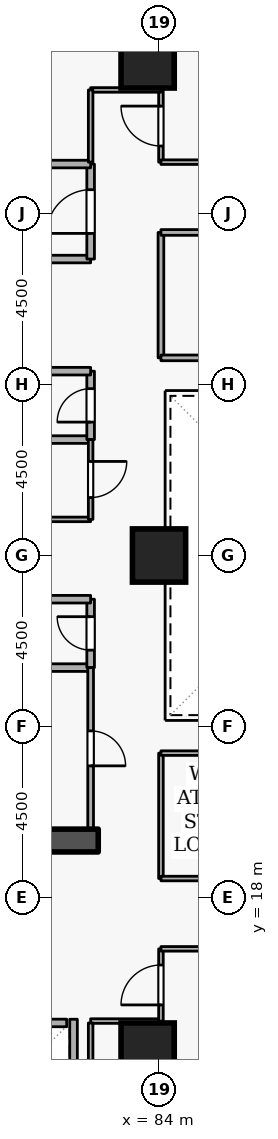
"""IFC4 building model, lengths in metres.
Left out: names, types, materials, properties, quantities, classifications, styles, units other than length and angle.
Written with IfcOpenShell. Run it as: python <this file> out.ifc"""

import sys

from ifc_helpers import new_model, si_unit, direction, frame, frame_2d, origin, origin_2d, place, context, subcontext, project, spatial, rectangle, extrude, element, fill, save


model = new_model("IFC4")
c1 = context("Model", 3, precision=1e-05, world=origin(), true_north=direction((0.0, 1.0)))
c2 = subcontext(c1, "Body", "Model", "MODEL_VIEW")
j1 = project(units=[si_unit("LENGTHUNIT", "METRE"), si_unit("PLANEANGLEUNIT", "RADIAN")], contexts=[c1])
p1 = place(None, origin())
s1 = spatial("IfcSite", under=j1, at=p1, CompositionType="ELEMENT")
p2 = place(p1, origin())
s2 = spatial("IfcBuilding", under=s1, at=p2, CompositionType="ELEMENT")
p3 = place(p2, frame((0.0, 0.0, 45.9)))
s3 = spatial("IfcBuildingStorey", under=s2, at=p3, CompositionType="ELEMENT", Elevation=45.9)
p4 = place(p3, frame((76.7, 19.5, 0.0), z_axis=(0.0, 0.0, 1.0), x_axis=(1.0, 0.0, 0.0)))
e1 = element("IfcWall", 1, at=p4, inside=s3, PredefinedType="SHEAR", context=c2, shape_type="SweptSolid", body=[
    extrude(rectangle(XDim=5.7, YDim=0.6, at=frame_2d((2.85, 0.0))), origin(), (0.0, 0.0, 1.0), 3.6),
])
for number, where, z_axis, x_axis in (
    (2, (83.7, 14.0, 0.0), (0.0, 0.0, 1.0), (1.0, 0.0, 0.0)),
    (3, (83.7, 40.0, 0.0), (0.0, 0.0, 1.0), (1.0, 0.0, 0.0)),
    (4, (84.0, 27.0, 0.0), (0.0, 0.0, 1.0), (1.0, 0.0, 0.0)),
):
    element("IfcColumn", number, at=place(p3, frame(where, z_axis=z_axis, x_axis=x_axis)), inside=s3, PredefinedType="COLUMN", context=c2, shape_type="SweptSolid", body=[
        extrude(rectangle(XDim=1.4, YDim=1.4, at=origin_2d()), origin(), (0.0, 0.0, 1.0), 3.6),
    ])
p5 = place(p3, frame((79.63, 14.7, 0.0), z_axis=(0.0, 0.0, 1.0), x_axis=(1.0, 0.0, 0.0)))
e5 = element("IfcWall", 5, at=p5, inside=s3, PredefinedType="STANDARD", context=c2, shape_type="SweptSolid", body=[
    extrude(rectangle(XDim=1.94, YDim=0.2, at=frame_2d((0.97, 0.0))), origin(), (0.0, 0.0, 1.0), 3.26),
])
p6 = place(p3, frame((81.75, 12.612, 0.0), z_axis=(0.0, 0.0, 1.0), x_axis=(0.0, 1.0, 0.0)))
e6 = element("IfcWall", 6, at=p6, inside=s3, PredefinedType="STANDARD", context=c2, shape_type="SweptSolid", body=[
    extrude(rectangle(XDim=2.186, YDim=0.2, at=frame_2d((1.093, 0.0))), origin(), (0.0, 0.0, 1.0), 3.26),
])
p7 = place(p3, frame((79.9, 34.8, 0.0), z_axis=(0.0, 0.0, 1.0), x_axis=(1.0, 0.0, 0.0)))
e7 = element("IfcWall", 7, at=p7, inside=s3, PredefinedType="STANDARD", context=c2, shape_type="SweptSolid", body=[
    extrude(rectangle(XDim=2.3, YDim=0.2, at=frame_2d((1.15, 0.0))), origin(), (0.0, 0.0, 1.0), 2.465),
])
p8 = place(p3, frame((82.2, 34.8, 0.0), z_axis=(0.0, 0.0, 1.0), x_axis=(0.0, 1.0, 0.0)))
e8 = element("IfcWall", 8, at=p8, inside=s3, PredefinedType="STANDARD", context=c2, shape_type="SweptSolid", body=[
    extrude(rectangle(XDim=2.5, YDim=0.2, at=frame_2d((1.25, 0.0))), origin(), (0.0, 0.0, 1.0), 3.26),
])
p9 = place(p8, frame((0.675, 0.0, 0.0)))
e9 = element("IfcOpeningElement", 9, at=p9, cuts=e8, PredefinedType="OPENING", context=c2, shape_type="SweptSolid", body=[
    extrude(rectangle(XDim=1.15, YDim=2.1, at=frame_2d((0.575, 1.05))), frame((0.0, 0.11, 0.0), z_axis=(0.0, -1.0, 0.0), x_axis=(1.0, 0.0, 0.0)), (0.0, 0.0, 1.0), 0.22),
])
p10 = place(p3, frame((82.2, 37.3, 0.0), z_axis=(0.0, 0.0, 1.0), x_axis=(-1.0, 0.0, 0.0)))
e10 = element("IfcWall", 10, at=p10, inside=s3, PredefinedType="STANDARD", context=c2, shape_type="SweptSolid", body=[
    extrude(rectangle(XDim=5.7, YDim=0.2, at=frame_2d((2.85, 0.0))), origin(), (0.0, 0.0, 1.0), 3.26),
])
p11 = place(p3, frame((80.15, 24.05, 0.0), z_axis=(0.0, 0.0, 1.0), x_axis=(1.0, 0.0, 0.0)))
e11 = element("IfcWall", 11, at=p11, inside=s3, PredefinedType="STANDARD", context=c2, shape_type="SweptSolid", body=[
    extrude(rectangle(XDim=2.05, YDim=0.2, at=frame_2d((1.025, 0.0))), origin(), (0.0, 0.0, 1.0), 3.26),
])
p12 = place(p3, frame((82.2, 24.05, 0.0), z_axis=(0.0, 0.0, 1.0), x_axis=(0.0, 1.0, 0.0)))
e12 = element("IfcWall", 12, at=p12, inside=s3, PredefinedType="STANDARD", context=c2, shape_type="SweptSolid", body=[
    extrude(rectangle(XDim=1.8, YDim=0.2, at=frame_2d((0.9, 0.0))), origin(), (0.0, 0.0, 1.0), 3.26),
])
p13 = place(p12, frame((0.46, 0.0, 0.0)))
e13 = element("IfcOpeningElement", 13, at=p13, cuts=e12, PredefinedType="OPENING", context=c2, shape_type="SweptSolid", body=[
    extrude(rectangle(XDim=0.88, YDim=2.04, at=frame_2d((0.44, 1.02))), frame((0.0, 0.11, 0.0), z_axis=(0.0, -1.0, 0.0), x_axis=(1.0, 0.0, 0.0)), (0.0, 0.0, 1.0), 0.22),
])
for number, where, z_axis, x_axis in (
    (14, (82.2, 25.85, 0.0), (0.0, 0.0, 1.0), (-1.0, 0.0, 0.0)),
    (15, (80.15, 30.05, 0.0), (0.0, 0.0, 1.0), (1.0, 0.0, 0.0)),
):
    element("IfcWall", number, at=place(p3, frame(where, z_axis=z_axis, x_axis=x_axis)), inside=s3, PredefinedType="STANDARD", context=c2, shape_type="SweptSolid", body=[
        extrude(rectangle(XDim=2.05, YDim=0.2, at=frame_2d((1.025, 0.0))), origin(), (0.0, 0.0, 1.0), 3.26),
    ])
p14 = place(p3, frame((82.2, 30.05, 0.0), z_axis=(0.0, 0.0, 1.0), x_axis=(0.0, 1.0, 0.0)))
e16 = element("IfcWall", 16, at=p14, inside=s3, PredefinedType="STANDARD", context=c2, shape_type="SweptSolid", body=[
    extrude(rectangle(XDim=1.8, YDim=0.2, at=frame_2d((0.9, 0.0))), origin(), (0.0, 0.0, 1.0), 3.26),
])
p15 = place(p14, frame((0.46, 0.0, 0.0)))
e17 = element("IfcOpeningElement", 17, at=p15, cuts=e16, PredefinedType="OPENING", context=c2, shape_type="SweptSolid", body=[
    extrude(rectangle(XDim=0.88, YDim=2.04, at=frame_2d((0.44, 1.02))), frame((0.0, 0.11, 0.0), z_axis=(0.0, -1.0, 0.0), x_axis=(1.0, 0.0, 0.0)), (0.0, 0.0, 1.0), 0.22),
])
p16 = place(p3, frame((82.2, 31.85, 0.0), z_axis=(0.0, 0.0, 1.0), x_axis=(-1.0, 0.0, 0.0)))
e18 = element("IfcWall", 18, at=p16, inside=s3, PredefinedType="STANDARD", context=c2, shape_type="SweptSolid", body=[
    extrude(rectangle(XDim=2.05, YDim=0.2, at=frame_2d((1.025, 0.0))), origin(), (0.0, 0.0, 1.0), 3.26),
])
p17 = place(p3, frame((82.2, 24.05, 0.0), z_axis=(0.0, 0.0, 1.0), x_axis=(0.0, -1.0, 0.0)))
e19 = element("IfcWall", 19, at=p17, inside=s3, PredefinedType="PARTITIONING", context=c2, shape_type="SweptSolid", body=[
    extrude(rectangle(XDim=4.25, YDim=0.15, at=frame_2d((2.125, 0.0))), origin(), (0.0, 0.0, 1.0), 3.26),
])
p18 = place(p17, frame((1.665, 0.0, 0.0)))
e20 = element("IfcOpeningElement", 20, at=p18, cuts=e19, PredefinedType="OPENING", context=c2, shape_type="SweptSolid", body=[
    extrude(rectangle(XDim=0.92, YDim=2.08, at=frame_2d((0.46, 1.04))), frame((0.0, 0.085, 0.0), z_axis=(0.0, -1.0, 0.0), x_axis=(1.0, 0.0, 0.0)), (0.0, 0.0, 1.0), 0.17),
])
p19 = place(p3, frame((82.2, 27.95, 0.0), z_axis=(0.0, 0.0, 1.0), x_axis=(-1.0, 0.0, 0.0)))
e21 = element("IfcWall", 21, at=p19, inside=s3, PredefinedType="PARTITIONING", context=c2, shape_type="SweptSolid", body=[
    extrude(rectangle(XDim=2.05, YDim=0.12, at=frame_2d((1.025, 0.0))), origin(), (0.0, 0.0, 1.0), 3.26),
])
p20 = place(p3, frame((82.2, 30.05, 0.0), z_axis=(0.0, 0.0, 1.0), x_axis=(0.0, -1.0, 0.0)))
e22 = element("IfcWall", 22, at=p20, inside=s3, PredefinedType="PARTITIONING", context=c2, shape_type="SweptSolid", body=[
    extrude(rectangle(XDim=2.1, YDim=0.12, at=frame_2d((1.05, 0.0))), origin(), (0.0, 0.0, 1.0), 3.26),
])
p21 = place(p20, frame((0.575, 0.0, 0.0)))
e23 = element("IfcOpeningElement", 23, at=p21, cuts=e22, PredefinedType="OPENING", context=c2, shape_type="SweptSolid", body=[
    extrude(rectangle(XDim=0.95, YDim=2.1, at=frame_2d((0.475, 1.05))), frame((0.0, 0.07, 0.0), z_axis=(0.0, -1.0, 0.0), x_axis=(1.0, 0.0, 0.0)), (0.0, 0.0, 1.0), 0.14),
])
p22 = place(p3, frame((82.2, 14.75, 0.0), z_axis=(0.0, 0.0, 1.0), x_axis=(1.0, 0.0, 0.0)))
e24 = element("IfcWall", 24, at=p22, inside=s3, PredefinedType="PARTITIONING", context=c2, shape_type="SweptSolid", body=[
    extrude(rectangle(XDim=1.85, YDim=0.12, at=frame_2d((0.925, 0.0))), origin(), (0.0, 0.0, 1.0), 3.26),
])
p23 = place(p3, frame((84.05, 14.75, 0.0), z_axis=(0.0, 0.0, 1.0), x_axis=(0.0, 1.0, 0.0)))
e25 = element("IfcWall", 25, at=p23, inside=s3, PredefinedType="PARTITIONING", context=c2, shape_type="SweptSolid", body=[
    extrude(rectangle(XDim=1.9, YDim=0.12, at=frame_2d((0.95, 0.0))), origin(), (0.0, 0.0, 1.0), 3.26),
])
p24 = place(p23, frame((0.425, 0.0, 0.0)))
e26 = element("IfcOpeningElement", 26, at=p24, cuts=e25, PredefinedType="OPENING", context=c2, shape_type="SweptSolid", body=[
    extrude(rectangle(XDim=1.05, YDim=2.1, at=frame_2d((0.525, 1.05))), frame((0.0, 0.07, 0.0), z_axis=(0.0, -1.0, 0.0), x_axis=(1.0, 0.0, 0.0)), (0.0, 0.0, 1.0), 0.14),
])
p25 = place(p3, frame((84.05, 16.65, 0.0), z_axis=(0.0, 0.0, 1.0), x_axis=(1.0, 0.0, 0.0)))
e27 = element("IfcWall", 27, at=p25, inside=s3, PredefinedType="PARTITIONING", context=c2, shape_type="SweptSolid", body=[
    extrude(rectangle(XDim=1.3, YDim=0.12, at=frame_2d((0.65, 0.0))), origin(), (0.0, 0.0, 1.0), 3.26),
])
p26 = place(p3, frame((82.2, 12.4, 0.0), z_axis=(0.0, 0.0, 1.0), x_axis=(0.0, 1.0, 0.0)))
e28 = element("IfcWall", 28, at=p26, inside=s3, PredefinedType="PARTITIONING", context=c2, shape_type="SweptSolid", body=[
    extrude(rectangle(XDim=2.3, YDim=0.12, at=frame_2d((1.15, 0.0))), origin(), (0.0, 0.0, 1.0), 3.26),
])
p27 = place(p3, frame((84.05, 37.35, 0.0), z_axis=(0.0, 0.0, 1.0), x_axis=(0.0, 1.0, 0.0)))
e29 = element("IfcWall", 29, at=p27, inside=s3, PredefinedType="PARTITIONING", context=c2, shape_type="SweptSolid", body=[
    extrude(rectangle(XDim=1.9, YDim=0.12, at=frame_2d((0.95, 0.0))), origin(), (0.0, 0.0, 1.0), 3.26),
])
p28 = place(p27, frame((0.425, 0.0, 0.0)))
e30 = element("IfcOpeningElement", 30, at=p28, cuts=e29, PredefinedType="OPENING", context=c2, shape_type="SweptSolid", body=[
    extrude(rectangle(XDim=1.05, YDim=2.1, at=frame_2d((0.525, 1.05))), frame((0.0, 0.07, 0.0), z_axis=(0.0, -1.0, 0.0), x_axis=(1.0, 0.0, 0.0)), (0.0, 0.0, 1.0), 0.14),
])
p29 = place(p3, frame((84.05, 39.25, 0.0), z_axis=(0.0, 0.0, 1.0), x_axis=(-1.0, 0.0, 0.0)))
e31 = element("IfcWall", 31, at=p29, inside=s3, PredefinedType="PARTITIONING", context=c2, shape_type="SweptSolid", body=[
    extrude(rectangle(XDim=1.85, YDim=0.12, at=frame_2d((0.925, 0.0))), origin(), (0.0, 0.0, 1.0), 3.26),
])
p30 = place(p3, frame((82.2, 39.25, 0.0), z_axis=(0.0, 0.0, 1.0), x_axis=(0.0, -1.0, 0.0)))
e32 = element("IfcWall", 32, at=p30, inside=s3, PredefinedType="PARTITIONING", context=c2, shape_type="SweptSolid", body=[
    extrude(rectangle(XDim=1.9, YDim=0.12, at=frame_2d((0.95, 0.0))), origin(), (0.0, 0.0, 1.0), 3.26),
])
p31 = place(p3, frame((85.35, 37.35, 0.0), z_axis=(0.0, 0.0, 1.0), x_axis=(-1.0, 0.0, 0.0)))
e33 = element("IfcWall", 33, at=p31, inside=s3, PredefinedType="PARTITIONING", context=c2, shape_type="SweptSolid", body=[
    extrude(rectangle(XDim=1.3, YDim=0.12, at=frame_2d((0.65, 0.0))), origin(), (0.0, 0.0, 1.0), 3.26),
])
p32 = place(p3, frame((84.05, 32.2, 0.0), z_axis=(0.0, 0.0, 1.0), x_axis=(0.0, 1.0, 0.0)))
e34 = element("IfcWall", 34, at=p32, inside=s3, PredefinedType="PARTITIONING", context=c2, shape_type="SweptSolid", body=[
    extrude(rectangle(XDim=3.3, YDim=0.15, at=frame_2d((1.65, 0.0))), origin(), (0.0, 0.0, 1.0), 3.26),
])
p33 = place(p3, frame((84.05, 35.5, 0.0), z_axis=(0.0, 0.0, 1.0), x_axis=(1.0, 0.0, 0.0)))
e35 = element("IfcWall", 35, at=p33, inside=s3, PredefinedType="PARTITIONING", context=c2, shape_type="SweptSolid", body=[
    extrude(rectangle(XDim=8.9, YDim=0.15, at=frame_2d((4.45, 0.0))), origin(), (0.0, 0.0, 1.0), 3.26),
])
p34 = place(p33, frame((2.48, 0.0, 0.0)))
e36 = element("IfcOpeningElement", 36, at=p34, cuts=e35, PredefinedType="OPENING", context=c2, shape_type="SweptSolid", body=[
    extrude(rectangle(XDim=1.3, YDim=2.12, at=frame_2d((0.65, 1.06))), frame((0.0, 0.085, 0.0), z_axis=(0.0, -1.0, 0.0), x_axis=(1.0, 0.0, 0.0)), (0.0, 0.0, 1.0), 0.17),
])
p35 = place(p3, frame((92.95, 32.2, 0.0), z_axis=(0.0, 0.0, 1.0), x_axis=(-1.0, 0.0, 0.0)))
e37 = element("IfcWall", 37, at=p35, inside=s3, PredefinedType="PARTITIONING", context=c2, shape_type="SweptSolid", body=[
    extrude(rectangle(XDim=8.9, YDim=0.15, at=frame_2d((4.45, 0.0))), origin(), (0.0, 0.0, 1.0), 3.26),
])
p36 = place(p3, frame((84.05, 18.5, 0.0), z_axis=(0.0, 0.0, 1.0), x_axis=(0.0, 1.0, 0.0)))
e38 = element("IfcWall", 38, at=p36, inside=s3, PredefinedType="PARTITIONING", context=c2, shape_type="SweptSolid", body=[
    extrude(rectangle(XDim=3.3, YDim=0.12, at=frame_2d((1.65, 0.0))), origin(), (0.0, 0.0, 1.0), 3.26),
])
p37 = place(p3, frame((84.05, 21.8, 0.0), z_axis=(0.0, 0.0, 1.0), x_axis=(1.0, 0.0, 0.0)))
e39 = element("IfcWall", 39, at=p37, inside=s3, PredefinedType="PARTITIONING", context=c2, shape_type="SweptSolid", body=[
    extrude(rectangle(XDim=8.9, YDim=0.12, at=frame_2d((4.45, 0.0))), origin(), (0.0, 0.0, 1.0), 3.26),
])
p38 = place(p3, frame((92.95, 18.5, 0.0), z_axis=(0.0, 0.0, 1.0), x_axis=(-1.0, 0.0, 0.0)))
e40 = element("IfcWall", 40, at=p38, inside=s3, PredefinedType="PARTITIONING", context=c2, shape_type="SweptSolid", body=[
    extrude(rectangle(XDim=8.9, YDim=0.12, at=frame_2d((4.45, 0.0))), origin(), (0.0, 0.0, 1.0), 3.26),
])
p39 = place(p38, frame((3.975, 0.0, 0.0)))
e41 = element("IfcOpeningElement", 41, at=p39, cuts=e40, PredefinedType="OPENING", context=c2, shape_type="SweptSolid", body=[
    extrude(rectangle(XDim=0.95, YDim=2.1, at=frame_2d((0.475, 1.05))), frame((0.0, 0.07, 0.0), z_axis=(0.0, -1.0, 0.0), x_axis=(1.0, 0.0, 0.0)), (0.0, 0.0, 1.0), 0.14),
])
p40 = place(p9, origin())
e42 = element("IfcDoor", 42, at=p40, inside=s3, OperationType="SINGLE_SWING_LEFT", PredefinedType="DOOR", context=c2, shape_type="SweptSolid", body=[
    extrude(rectangle(XDim=1.15, YDim=2.1, at=frame_2d((0.575, 1.05))), frame((0.0, 0.025, 0.0), z_axis=(0.0, -1.0, 0.0), x_axis=(1.0, 0.0, 0.0)), (0.0, 0.0, 1.0), 0.05),
])
fill(e9, e42)
p41 = place(p13, origin())
e43 = element("IfcDoor", 43, at=p41, inside=s3, OperationType="SINGLE_SWING_RIGHT", PredefinedType="DOOR", context=c2, shape_type="SweptSolid", body=[
    extrude(rectangle(XDim=0.88, YDim=2.04, at=frame_2d((0.44, 1.02))), frame((0.0, 0.025, 0.0), z_axis=(0.0, -1.0, 0.0), x_axis=(1.0, 0.0, 0.0)), (0.0, 0.0, 1.0), 0.05),
])
fill(e13, e43)
p42 = place(p15, origin())
e44 = element("IfcDoor", 44, at=p42, inside=s3, OperationType="SINGLE_SWING_LEFT", PredefinedType="DOOR", context=c2, shape_type="SweptSolid", body=[
    extrude(rectangle(XDim=0.88, YDim=2.04, at=frame_2d((0.44, 1.02))), frame((0.0, 0.025, 0.0), z_axis=(0.0, -1.0, 0.0), x_axis=(1.0, 0.0, 0.0)), (0.0, 0.0, 1.0), 0.05),
])
fill(e17, e44)
p43 = place(p18, origin())
e45 = element("IfcDoor", 45, at=p43, inside=s3, OperationType="SINGLE_SWING_RIGHT", PredefinedType="DOOR", context=c2, shape_type="SweptSolid", body=[
    extrude(rectangle(XDim=0.92, YDim=2.08, at=frame_2d((0.46, 1.04))), frame((0.0, 0.025, 0.0), z_axis=(0.0, -1.0, 0.0), x_axis=(1.0, 0.0, 0.0)), (0.0, 0.0, 1.0), 0.05),
])
fill(e20, e45)
p44 = place(p21, origin())
e46 = element("IfcDoor", 46, at=p44, inside=s3, OperationType="SINGLE_SWING_LEFT", PredefinedType="DOOR", context=c2, shape_type="SweptSolid", body=[
    extrude(rectangle(XDim=0.95, YDim=2.1, at=frame_2d((0.475, 1.05))), frame((0.0, 0.025, 0.0), z_axis=(0.0, -1.0, 0.0), x_axis=(1.0, 0.0, 0.0)), (0.0, 0.0, 1.0), 0.05),
])
fill(e23, e46)
p45 = place(p24, origin())
e47 = element("IfcDoor", 47, at=p45, inside=s3, OperationType="SINGLE_SWING_LEFT", PredefinedType="DOOR", context=c2, shape_type="SweptSolid", body=[
    extrude(rectangle(XDim=1.05, YDim=2.1, at=frame_2d((0.525, 1.05))), frame((0.0, 0.025, 0.0), z_axis=(0.0, -1.0, 0.0), x_axis=(1.0, 0.0, 0.0)), (0.0, 0.0, 1.0), 0.05),
])
fill(e26, e47)
p46 = place(p28, origin())
e48 = element("IfcDoor", 48, at=p46, inside=s3, OperationType="SINGLE_SWING_RIGHT", PredefinedType="DOOR", context=c2, shape_type="SweptSolid", body=[
    extrude(rectangle(XDim=1.05, YDim=2.1, at=frame_2d((0.525, 1.05))), frame((0.0, 0.025, 0.0), z_axis=(0.0, -1.0, 0.0), x_axis=(1.0, 0.0, 0.0)), (0.0, 0.0, 1.0), 0.05),
])
fill(e30, e48)
save(model, sys.argv[1])
